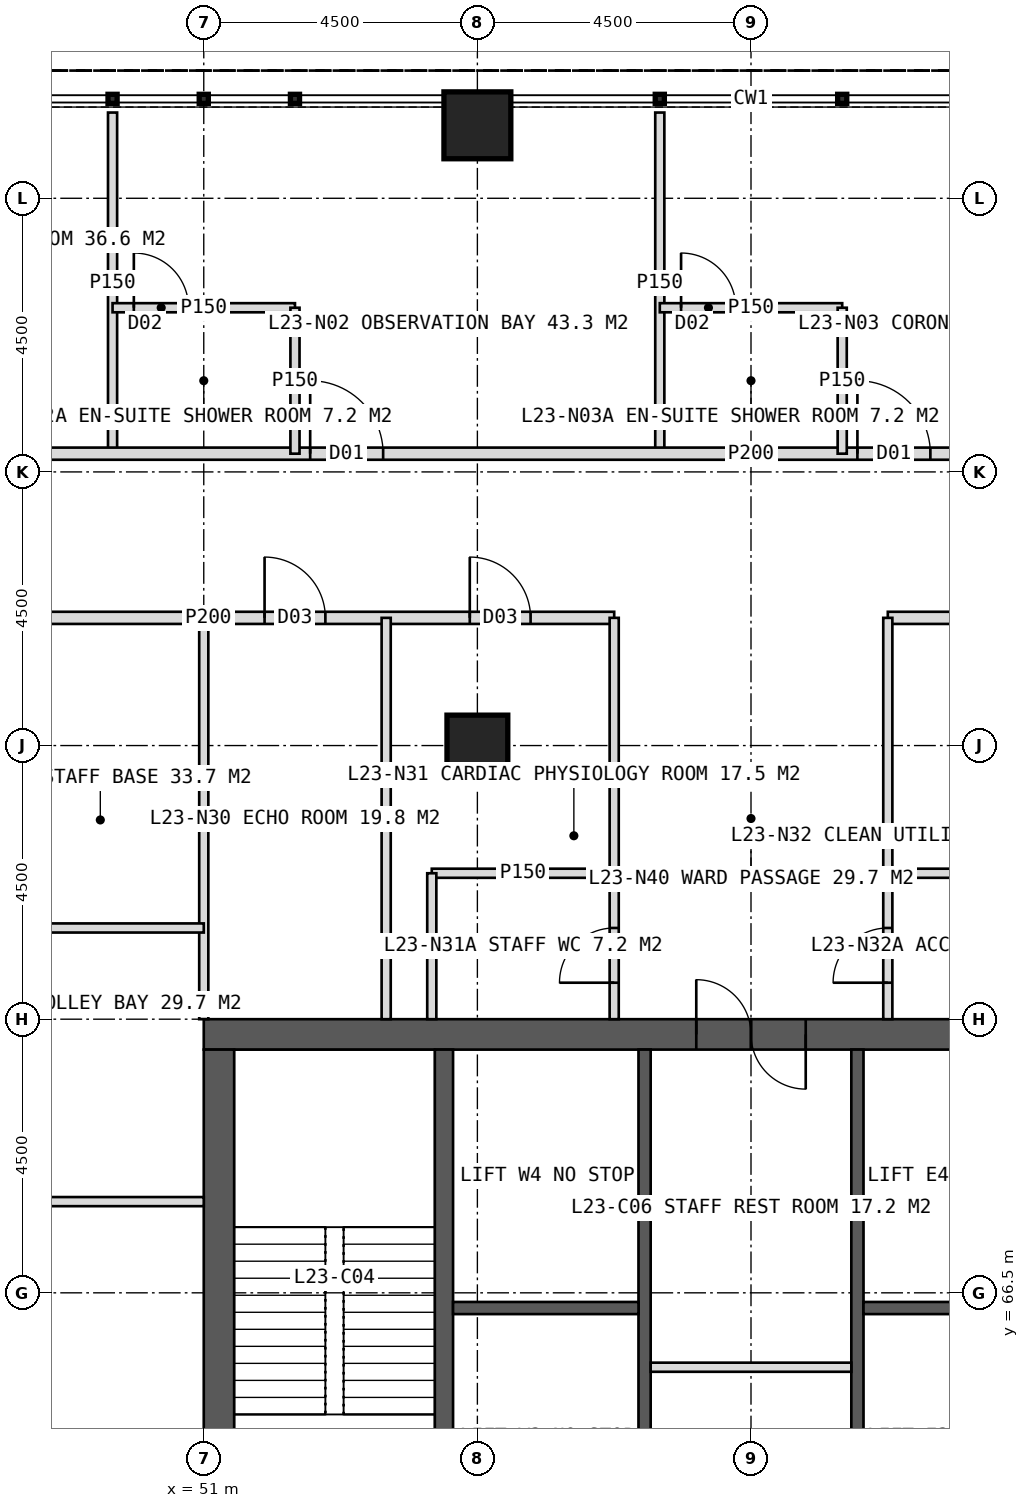
"""IFC4 building model, lengths in metres.
Left out: names, types, materials, properties, quantities, classifications, styles, units other than length and angle.
Written with IfcOpenShell. Run it as: python <this file> out.ifc"""

import sys

from ifc_helpers import new_model, si_unit, direction, frame, frame_2d, origin, origin_2d, place, context, subcontext, project, spatial, rectangle, hollow_rectangle, extrude, element, fill, save


model = new_model("IFC4")
c1 = context("Model", 3, precision=1e-05, world=origin(), true_north=direction((0.0, 1.0)))
c2 = subcontext(c1, "Body", "Model", "MODEL_VIEW")
j1 = project(units=[si_unit("LENGTHUNIT", "METRE"), si_unit("PLANEANGLEUNIT", "RADIAN")], contexts=[c1])
p1 = place(None, origin())
s1 = spatial("IfcSite", under=j1, at=p1, CompositionType="ELEMENT")
p2 = place(p1, origin())
s2 = spatial("IfcBuilding", under=s1, at=p2, CompositionType="ELEMENT")
p3 = place(p2, frame((0.0, 0.0, 100.0)))
s3 = spatial("IfcBuildingStorey", under=s2, at=p3, CompositionType="ELEMENT", Elevation=100.0)
p4 = place(p3, frame((51.0, 70.75, 0.0), z_axis=(0.0, 0.0, 1.0), x_axis=(1.0, 0.0, 0.0)))
e1 = element("IfcWall", 1, at=p4, inside=s3, PredefinedType="SHEAR", context=c2, shape_type="SweptSolid", body=[
    extrude(rectangle(XDim=18.0, YDim=0.5, at=frame_2d((9.0, 0.0))), origin(), (0.0, 0.0, 1.0), 4.0),
])
p5 = place(p4, frame((8.1, 0.0, 0.0)))
e2 = element("IfcOpeningElement", 2, at=p5, cuts=e1, PredefinedType="OPENING", context=c2, shape_type="SweptSolid", body=[
    extrude(rectangle(XDim=1.8, YDim=2.2, at=frame_2d((0.9, 1.1))), frame((0.0, 0.26, 0.0), z_axis=(0.0, -1.0, 0.0), x_axis=(1.0, 0.0, 0.0)), (0.0, 0.0, 1.0), 0.52),
])
p6 = place(p3, frame((51.25, 53.5, 0.0), z_axis=(0.0, 0.0, 1.0), x_axis=(0.0, 1.0, 0.0)))
e3 = element("IfcWall", 3, at=p6, inside=s3, PredefinedType="SHEAR", context=c2, shape_type="SweptSolid", body=[
    extrude(rectangle(XDim=17.0, YDim=0.5, at=frame_2d((8.5, 0.0))), origin(), (0.0, 0.0, 1.0), 4.0),
])
p7 = place(p6, frame((6.0, 0.0, 0.0)))
e4 = element("IfcOpeningElement", 4, at=p7, cuts=e3, PredefinedType="OPENING", context=c2, shape_type="SweptSolid", body=[
    extrude(rectangle(XDim=1.5, YDim=2.2, at=frame_2d((0.75, 1.1))), frame((0.0, 0.26, 0.0), z_axis=(0.0, -1.0, 0.0), x_axis=(1.0, 0.0, 0.0)), (0.0, 0.0, 1.0), 0.52),
])
p8 = place(p3, frame((54.95, 53.5, 0.0), z_axis=(0.0, 0.0, 1.0), x_axis=(0.0, 1.0, 0.0)))
e5 = element("IfcWall", 5, at=p8, inside=s3, PredefinedType="SHEAR", context=c2, shape_type="SweptSolid", body=[
    extrude(rectangle(XDim=17.0, YDim=0.3, at=frame_2d((8.5, 0.0))), origin(), (0.0, 0.0, 1.0), 4.0),
])
p9 = place(p3, frame((58.25, 53.5, 0.0), z_axis=(0.0, 0.0, 1.0), x_axis=(0.0, 1.0, 0.0)))
e6 = element("IfcWall", 6, at=p9, inside=s3, PredefinedType="SHEAR", context=c2, shape_type="SweptSolid", body=[
    extrude(rectangle(XDim=17.0, YDim=0.2, at=frame_2d((8.5, 0.0))), origin(), (0.0, 0.0, 1.0), 4.0),
])
p10 = place(p9, frame((1.375, 0.0, 0.0)))
e7 = element("IfcOpeningElement", 7, at=p10, cuts=e6, PredefinedType="OPENING", context=c2, shape_type="SweptSolid", body=[
    extrude(rectangle(XDim=1.4, YDim=2.2, at=frame_2d((0.7, 1.1))), frame((0.0, 0.11, 0.0), z_axis=(0.0, -1.0, 0.0), x_axis=(1.0, 0.0, 0.0)), (0.0, 0.0, 1.0), 0.22),
])
p11 = place(p9, frame((5.675, 0.0, 0.0)))
e8 = element("IfcOpeningElement", 8, at=p11, cuts=e6, PredefinedType="OPENING", context=c2, shape_type="SweptSolid", body=[
    extrude(rectangle(XDim=1.4, YDim=2.2, at=frame_2d((0.7, 1.1))), frame((0.0, 0.11, 0.0), z_axis=(0.0, -1.0, 0.0), x_axis=(1.0, 0.0, 0.0)), (0.0, 0.0, 1.0), 0.22),
])
p12 = place(p3, frame((61.75, 53.5, 0.0), z_axis=(0.0, 0.0, 1.0), x_axis=(0.0, 1.0, 0.0)))
e9 = element("IfcWall", 9, at=p12, inside=s3, PredefinedType="SHEAR", context=c2, shape_type="SweptSolid", body=[
    extrude(rectangle(XDim=17.0, YDim=0.2, at=frame_2d((8.5, 0.0))), origin(), (0.0, 0.0, 1.0), 4.0),
])
p13 = place(p12, frame((1.375, 0.0, 0.0)))
e10 = element("IfcOpeningElement", 10, at=p13, cuts=e9, PredefinedType="OPENING", context=c2, shape_type="SweptSolid", body=[
    extrude(rectangle(XDim=1.4, YDim=2.2, at=frame_2d((0.7, 1.1))), frame((0.0, 0.11, 0.0), z_axis=(0.0, -1.0, 0.0), x_axis=(1.0, 0.0, 0.0)), (0.0, 0.0, 1.0), 0.22),
])
p14 = place(p12, frame((5.675, 0.0, 0.0)))
e11 = element("IfcOpeningElement", 11, at=p14, cuts=e9, PredefinedType="OPENING", context=c2, shape_type="SweptSolid", body=[
    extrude(rectangle(XDim=1.4, YDim=2.2, at=frame_2d((0.7, 1.1))), frame((0.0, 0.11, 0.0), z_axis=(0.0, -1.0, 0.0), x_axis=(1.0, 0.0, 0.0)), (0.0, 0.0, 1.0), 0.22),
])
for number, where, z_axis, x_axis in (
    (12, (55.1, 66.25, 0.0), (0.0, 0.0, 1.0), (1.0, 0.0, 0.0)),
    (13, (61.85, 66.25, 0.0), (0.0, 0.0, 1.0), (1.0, 0.0, 0.0)),
):
    element("IfcWall", number, at=place(p3, frame(where, z_axis=z_axis, x_axis=x_axis)), inside=s3, PredefinedType="SHEAR", context=c2, shape_type="SweptSolid", body=[
        extrude(rectangle(XDim=3.05, YDim=0.2, at=frame_2d((1.525, 0.0))), origin(), (0.0, 0.0, 1.0), 4.0),
    ])
p15 = place(p3, frame((55.5, 75.5, 0.0), z_axis=(0.0, 0.0, 1.0), x_axis=(1.0, 0.0, 0.0)))
e14 = element("IfcColumn", 14, at=p15, inside=s3, PredefinedType="COLUMN", context=c2, shape_type="SweptSolid", body=[
    extrude(hollow_rectangle(XDim=1.0, YDim=1.0, WallThickness=0.1, at=origin_2d()), origin(), (0.0, 0.0, 1.0), 4.0),
])
p16 = place(p3, frame((55.5, 85.7, 0.0), z_axis=(0.0, 0.0, 1.0), x_axis=(1.0, 0.0, 0.0)))
e15 = element("IfcColumn", 15, at=p16, inside=s3, PredefinedType="COLUMN", context=c2, shape_type="SweptSolid", body=[
    extrude(hollow_rectangle(XDim=1.1, YDim=1.1, WallThickness=0.1, at=origin_2d()), origin(), (0.0, 0.0, 1.0), 4.0),
])
for number, where, z_axis, x_axis in (
    (16, (49.5, 80.3, 0.0), (0.0, 0.0, 1.0), (0.0, 1.0, 0.0)),
    (17, (58.5, 80.3, 0.0), (0.0, 0.0, 1.0), (0.0, 1.0, 0.0)),
):
    element("IfcWall", number, at=place(p3, frame(where, z_axis=z_axis, x_axis=x_axis)), inside=s3, PredefinedType="PARTITIONING", context=c2, shape_type="SweptSolid", body=[
        extrude(rectangle(XDim=5.61, YDim=0.15, at=frame_2d((2.805, 0.0))), origin(), (0.0, 0.0, 1.0), 3.75),
    ])
p17 = place(p3, frame((41.7, 80.3, 0.0), z_axis=(0.0, 0.0, 1.0), x_axis=(1.0, 0.0, 0.0)))
e18 = element("IfcWall", 18, at=p17, inside=s3, PredefinedType="PARTITIONING", context=c2, shape_type="SweptSolid", body=[
    extrude(rectangle(XDim=36.6, YDim=0.2, at=frame_2d((18.3, 0.0))), origin(), (0.0, 0.0, 1.0), 3.75),
])
p18 = place(p17, frame((3.25, 0.0, 0.0)))
e19 = element("IfcOpeningElement", 19, at=p18, cuts=e18, PredefinedType="OPENING", context=c2, shape_type="SweptSolid", body=[
    extrude(rectangle(XDim=1.2, YDim=2.2, at=frame_2d((0.6, 1.1))), frame((0.0, 0.11, 0.0), z_axis=(0.0, -1.0, 0.0), x_axis=(1.0, 0.0, 0.0)), (0.0, 0.0, 1.0), 0.22),
])
p19 = place(p17, frame((11.05, 0.0, 0.0)))
e20 = element("IfcOpeningElement", 20, at=p19, cuts=e18, PredefinedType="OPENING", context=c2, shape_type="SweptSolid", body=[
    extrude(rectangle(XDim=1.2, YDim=2.2, at=frame_2d((0.6, 1.1))), frame((0.0, 0.11, 0.0), z_axis=(0.0, -1.0, 0.0), x_axis=(1.0, 0.0, 0.0)), (0.0, 0.0, 1.0), 0.22),
])
p20 = place(p17, frame((20.05, 0.0, 0.0)))
e21 = element("IfcOpeningElement", 21, at=p20, cuts=e18, PredefinedType="OPENING", context=c2, shape_type="SweptSolid", body=[
    extrude(rectangle(XDim=1.2, YDim=2.2, at=frame_2d((0.6, 1.1))), frame((0.0, 0.11, 0.0), z_axis=(0.0, -1.0, 0.0), x_axis=(1.0, 0.0, 0.0)), (0.0, 0.0, 1.0), 0.22),
])
p21 = place(p17, frame((29.05, 0.0, 0.0)))
e22 = element("IfcOpeningElement", 22, at=p21, cuts=e18, PredefinedType="OPENING", context=c2, shape_type="SweptSolid", body=[
    extrude(rectangle(XDim=1.2, YDim=2.2, at=frame_2d((0.6, 1.1))), frame((0.0, 0.11, 0.0), z_axis=(0.0, -1.0, 0.0), x_axis=(1.0, 0.0, 0.0)), (0.0, 0.0, 1.0), 0.22),
])
p22 = place(p17, frame((34.95, 0.0, 0.0)))
e23 = element("IfcOpeningElement", 23, at=p22, cuts=e18, PredefinedType="OPENING", context=c2, shape_type="SweptSolid", body=[
    extrude(rectangle(XDim=1.0, YDim=2.1, at=frame_2d((0.5, 1.05))), frame((0.0, 0.11, 0.0), z_axis=(0.0, -1.0, 0.0), x_axis=(1.0, 0.0, 0.0)), (0.0, 0.0, 1.0), 0.22),
])
p23 = place(p3, frame((49.5, 82.7, 0.0), z_axis=(0.0, 0.0, 1.0), x_axis=(1.0, 0.0, 0.0)))
e24 = element("IfcWall", 24, at=p23, inside=s3, PredefinedType="PARTITIONING", context=c2, shape_type="SweptSolid", body=[
    extrude(rectangle(XDim=3.0, YDim=0.15, at=frame_2d((1.5, 0.0))), origin(), (0.0, 0.0, 1.0), 3.75),
])
p24 = place(p23, frame((0.35, 0.0, 0.0)))
e25 = element("IfcOpeningElement", 25, at=p24, cuts=e24, PredefinedType="OPENING", context=c2, shape_type="SweptSolid", body=[
    extrude(rectangle(XDim=0.9, YDim=2.1, at=frame_2d((0.45, 1.05))), frame((0.0, 0.085, 0.0), z_axis=(0.0, -1.0, 0.0), x_axis=(1.0, 0.0, 0.0)), (0.0, 0.0, 1.0), 0.17),
])
p25 = place(p3, frame((52.5, 80.3, 0.0), z_axis=(0.0, 0.0, 1.0), x_axis=(0.0, 1.0, 0.0)))
e26 = element("IfcWall", 26, at=p25, inside=s3, PredefinedType="PARTITIONING", context=c2, shape_type="SweptSolid", body=[
    extrude(rectangle(XDim=2.4, YDim=0.15, at=frame_2d((1.2, 0.0))), origin(), (0.0, 0.0, 1.0), 3.75),
])
p26 = place(p3, frame((58.5, 82.7, 0.0), z_axis=(0.0, 0.0, 1.0), x_axis=(1.0, 0.0, 0.0)))
e27 = element("IfcWall", 27, at=p26, inside=s3, PredefinedType="PARTITIONING", context=c2, shape_type="SweptSolid", body=[
    extrude(rectangle(XDim=3.0, YDim=0.15, at=frame_2d((1.5, 0.0))), origin(), (0.0, 0.0, 1.0), 3.75),
])
p27 = place(p26, frame((0.35, 0.0, 0.0)))
e28 = element("IfcOpeningElement", 28, at=p27, cuts=e27, PredefinedType="OPENING", context=c2, shape_type="SweptSolid", body=[
    extrude(rectangle(XDim=0.9, YDim=2.1, at=frame_2d((0.45, 1.05))), frame((0.0, 0.085, 0.0), z_axis=(0.0, -1.0, 0.0), x_axis=(1.0, 0.0, 0.0)), (0.0, 0.0, 1.0), 0.17),
])
p28 = place(p3, frame((61.5, 80.3, 0.0), z_axis=(0.0, 0.0, 1.0), x_axis=(0.0, 1.0, 0.0)))
e29 = element("IfcWall", 29, at=p28, inside=s3, PredefinedType="PARTITIONING", context=c2, shape_type="SweptSolid", body=[
    extrude(rectangle(XDim=2.4, YDim=0.15, at=frame_2d((1.2, 0.0))), origin(), (0.0, 0.0, 1.0), 3.75),
])
p29 = place(p3, frame((51.0, 71.0, 0.0), z_axis=(0.0, 0.0, 1.0), x_axis=(0.0, 1.0, 0.0)))
e30 = element("IfcWall", 30, at=p29, inside=s3, PredefinedType="PARTITIONING", context=c2, shape_type="SweptSolid", body=[
    extrude(rectangle(XDim=6.6, YDim=0.15, at=frame_2d((3.3, 0.0))), origin(), (0.0, 0.0, 1.0), 3.75),
])
p30 = place(p3, frame((44.4, 77.6, 0.0), z_axis=(0.0, 0.0, 1.0), x_axis=(1.0, 0.0, 0.0)))
e31 = element("IfcWall", 31, at=p30, inside=s3, PredefinedType="PARTITIONING", context=c2, shape_type="SweptSolid", body=[
    extrude(rectangle(XDim=13.35, YDim=0.2, at=frame_2d((6.675, 0.0))), origin(), (0.0, 0.0, 1.0), 3.75),
])
p31 = place(p30, frame((7.6, 0.0, 0.0)))
e32 = element("IfcOpeningElement", 32, at=p31, cuts=e31, PredefinedType="OPENING", context=c2, shape_type="SweptSolid", body=[
    extrude(rectangle(XDim=1.0, YDim=2.1, at=frame_2d((0.5, 1.05))), frame((0.0, 0.11, 0.0), z_axis=(0.0, -1.0, 0.0), x_axis=(1.0, 0.0, 0.0)), (0.0, 0.0, 1.0), 0.22),
])
p32 = place(p30, frame((10.975, 0.0, 0.0)))
e33 = element("IfcOpeningElement", 33, at=p32, cuts=e31, PredefinedType="OPENING", context=c2, shape_type="SweptSolid", body=[
    extrude(rectangle(XDim=1.0, YDim=2.1, at=frame_2d((0.5, 1.05))), frame((0.0, 0.11, 0.0), z_axis=(0.0, -1.0, 0.0), x_axis=(1.0, 0.0, 0.0)), (0.0, 0.0, 1.0), 0.22),
])
p33 = place(p3, frame((62.25, 77.6, 0.0), z_axis=(0.0, 0.0, 1.0), x_axis=(1.0, 0.0, 0.0)))
e34 = element("IfcWall", 34, at=p33, inside=s3, PredefinedType="PARTITIONING", context=c2, shape_type="SweptSolid", body=[
    extrude(rectangle(XDim=6.75, YDim=0.2, at=frame_2d((3.375, 0.0))), origin(), (0.0, 0.0, 1.0), 3.75),
])
p34 = place(p33, frame((1.375, 0.0, 0.0)))
e35 = element("IfcOpeningElement", 35, at=p34, cuts=e34, PredefinedType="OPENING", context=c2, shape_type="SweptSolid", body=[
    extrude(rectangle(XDim=1.0, YDim=2.1, at=frame_2d((0.5, 1.05))), frame((0.0, 0.11, 0.0), z_axis=(0.0, -1.0, 0.0), x_axis=(1.0, 0.0, 0.0)), (0.0, 0.0, 1.0), 0.22),
])
p35 = place(p33, frame((4.75, 0.0, 0.0)))
e36 = element("IfcOpeningElement", 36, at=p35, cuts=e34, PredefinedType="OPENING", context=c2, shape_type="SweptSolid", body=[
    extrude(rectangle(XDim=1.0, YDim=2.1, at=frame_2d((0.5, 1.05))), frame((0.0, 0.11, 0.0), z_axis=(0.0, -1.0, 0.0), x_axis=(1.0, 0.0, 0.0)), (0.0, 0.0, 1.0), 0.22),
])
p36 = place(p3, frame((57.75, 71.0, 0.0), z_axis=(0.0, 0.0, 1.0), x_axis=(0.0, 1.0, 0.0)))
e37 = element("IfcWall", 37, at=p36, inside=s3, PredefinedType="PARTITIONING", context=c2, shape_type="SweptSolid", body=[
    extrude(rectangle(XDim=6.6, YDim=0.15, at=frame_2d((3.3, 0.0))), origin(), (0.0, 0.0, 1.0), 3.75),
])
p37 = place(p36, frame((0.6, 0.0, 0.0)))
e38 = element("IfcOpeningElement", 38, at=p37, cuts=e37, PredefinedType="OPENING", context=c2, shape_type="SweptSolid", body=[
    extrude(rectangle(XDim=0.9, YDim=2.1, at=frame_2d((0.45, 1.05))), frame((0.0, 0.085, 0.0), z_axis=(0.0, -1.0, 0.0), x_axis=(1.0, 0.0, 0.0)), (0.0, 0.0, 1.0), 0.17),
])
p38 = place(p3, frame((62.25, 71.0, 0.0), z_axis=(0.0, 0.0, 1.0), x_axis=(0.0, 1.0, 0.0)))
e39 = element("IfcWall", 39, at=p38, inside=s3, PredefinedType="PARTITIONING", context=c2, shape_type="SweptSolid", body=[
    extrude(rectangle(XDim=6.6, YDim=0.15, at=frame_2d((3.3, 0.0))), origin(), (0.0, 0.0, 1.0), 3.75),
])
p39 = place(p38, frame((0.6, 0.0, 0.0)))
e40 = element("IfcOpeningElement", 40, at=p39, cuts=e39, PredefinedType="OPENING", context=c2, shape_type="SweptSolid", body=[
    extrude(rectangle(XDim=0.9, YDim=2.1, at=frame_2d((0.45, 1.05))), frame((0.0, 0.085, 0.0), z_axis=(0.0, -1.0, 0.0), x_axis=(1.0, 0.0, 0.0)), (0.0, 0.0, 1.0), 0.17),
])
p40 = place(p3, frame((54.0, 71.0, 0.0), z_axis=(0.0, 0.0, 1.0), x_axis=(0.0, 1.0, 0.0)))
e41 = element("IfcWall", 41, at=p40, inside=s3, PredefinedType="PARTITIONING", context=c2, shape_type="SweptSolid", body=[
    extrude(rectangle(XDim=6.6, YDim=0.15, at=frame_2d((3.3, 0.0))), origin(), (0.0, 0.0, 1.0), 3.75),
])
p41 = place(p3, frame((54.75, 73.4, 0.0), z_axis=(0.0, 0.0, 1.0), x_axis=(1.0, 0.0, 0.0)))
e42 = element("IfcWall", 42, at=p41, inside=s3, PredefinedType="PARTITIONING", context=c2, shape_type="SweptSolid", body=[
    extrude(rectangle(XDim=3.0, YDim=0.15, at=frame_2d((1.5, 0.0))), origin(), (0.0, 0.0, 1.0), 3.75),
])
p42 = place(p3, frame((54.75, 71.0, 0.0), z_axis=(0.0, 0.0, 1.0), x_axis=(0.0, 1.0, 0.0)))
e43 = element("IfcWall", 43, at=p42, inside=s3, PredefinedType="PARTITIONING", context=c2, shape_type="SweptSolid", body=[
    extrude(rectangle(XDim=2.4, YDim=0.15, at=frame_2d((1.2, 0.0))), origin(), (0.0, 0.0, 1.0), 3.75),
])
p43 = place(p3, frame((62.25, 73.4, 0.0), z_axis=(0.0, 0.0, 1.0), x_axis=(1.0, 0.0, 0.0)))
e44 = element("IfcWall", 44, at=p43, inside=s3, PredefinedType="PARTITIONING", context=c2, shape_type="SweptSolid", body=[
    extrude(rectangle(XDim=3.0, YDim=0.15, at=frame_2d((1.5, 0.0))), origin(), (0.0, 0.0, 1.0), 3.75),
])
for number, where, z_axis, x_axis in (
    (45, (51.0, 68.0, 0.0), (0.0, 0.0, 1.0), (-1.0, 0.0, 0.0)),
    (46, (51.0, 72.5, 0.0), (0.0, 0.0, 1.0), (-1.0, 0.0, 0.0)),
):
    element("IfcWall", number, at=place(p3, frame(where, z_axis=z_axis, x_axis=x_axis)), inside=s3, PredefinedType="PARTITIONING", context=c2, shape_type="SweptSolid", body=[
        extrude(rectangle(XDim=6.6, YDim=0.15, at=frame_2d((3.3, 0.0))), origin(), (0.0, 0.0, 1.0), 3.75),
    ])
p44 = place(p3, frame((58.35, 65.277, 0.0), z_axis=(0.0, 0.0, 1.0), x_axis=(1.0, 0.0, 0.0)))
e47 = element("IfcWall", 47, at=p44, inside=s3, PredefinedType="PARTITIONING", context=c2, shape_type="SweptSolid", body=[
    extrude(rectangle(XDim=3.3, YDim=0.15, at=frame_2d((1.65, 0.0))), origin(), (0.0, 0.0, 1.0), 3.75),
])
p45 = place(p19, origin())
e48 = element("IfcDoor", 48, at=p45, inside=s3, OperationType="SINGLE_SWING_LEFT", PredefinedType="DOOR", context=c2, shape_type="SweptSolid", body=[
    extrude(rectangle(XDim=1.2, YDim=2.2, at=frame_2d((0.6, 1.1))), frame((0.0, 0.025, 0.0), z_axis=(0.0, -1.0, 0.0), x_axis=(1.0, 0.0, 0.0)), (0.0, 0.0, 1.0), 0.05),
])
fill(e20, e48)
p46 = place(p24, origin())
e49 = element("IfcDoor", 49, at=p46, inside=s3, OperationType="SINGLE_SWING_LEFT", PredefinedType="DOOR", context=c2, shape_type="SweptSolid", body=[
    extrude(rectangle(XDim=0.9, YDim=2.1, at=frame_2d((0.45, 1.05))), frame((0.0, 0.025, 0.0), z_axis=(0.0, -1.0, 0.0), x_axis=(1.0, 0.0, 0.0)), (0.0, 0.0, 1.0), 0.05),
])
fill(e25, e49)
p47 = place(p20, origin())
e50 = element("IfcDoor", 50, at=p47, inside=s3, OperationType="SINGLE_SWING_LEFT", PredefinedType="DOOR", context=c2, shape_type="SweptSolid", body=[
    extrude(rectangle(XDim=1.2, YDim=2.2, at=frame_2d((0.6, 1.1))), frame((0.0, 0.025, 0.0), z_axis=(0.0, -1.0, 0.0), x_axis=(1.0, 0.0, 0.0)), (0.0, 0.0, 1.0), 0.05),
])
fill(e21, e50)
p48 = place(p27, origin())
e51 = element("IfcDoor", 51, at=p48, inside=s3, OperationType="SINGLE_SWING_LEFT", PredefinedType="DOOR", context=c2, shape_type="SweptSolid", body=[
    extrude(rectangle(XDim=0.9, YDim=2.1, at=frame_2d((0.45, 1.05))), frame((0.0, 0.025, 0.0), z_axis=(0.0, -1.0, 0.0), x_axis=(1.0, 0.0, 0.0)), (0.0, 0.0, 1.0), 0.05),
])
fill(e28, e51)
p49 = place(p31, origin())
e52 = element("IfcDoor", 52, at=p49, inside=s3, OperationType="SINGLE_SWING_LEFT", PredefinedType="DOOR", context=c2, shape_type="SweptSolid", body=[
    extrude(rectangle(XDim=1.0, YDim=2.1, at=frame_2d((0.5, 1.05))), frame((0.0, 0.025, 0.0), z_axis=(0.0, -1.0, 0.0), x_axis=(1.0, 0.0, 0.0)), (0.0, 0.0, 1.0), 0.05),
])
fill(e32, e52)
p50 = place(p37, origin())
e53 = element("IfcDoor", 53, at=p50, inside=s3, OperationType="SINGLE_SWING_LEFT", PredefinedType="DOOR", context=c2, shape_type="SweptSolid", body=[
    extrude(rectangle(XDim=0.9, YDim=2.1, at=frame_2d((0.45, 1.05))), frame((0.0, 0.025, 0.0), z_axis=(0.0, -1.0, 0.0), x_axis=(1.0, 0.0, 0.0)), (0.0, 0.0, 1.0), 0.05),
])
fill(e38, e53)
p51 = place(p32, origin())
e54 = element("IfcDoor", 54, at=p51, inside=s3, OperationType="SINGLE_SWING_LEFT", PredefinedType="DOOR", context=c2, shape_type="SweptSolid", body=[
    extrude(rectangle(XDim=1.0, YDim=2.1, at=frame_2d((0.5, 1.05))), frame((0.0, 0.025, 0.0), z_axis=(0.0, -1.0, 0.0), x_axis=(1.0, 0.0, 0.0)), (0.0, 0.0, 1.0), 0.05),
])
fill(e33, e54)
p52 = place(p39, origin())
e55 = element("IfcDoor", 55, at=p52, inside=s3, OperationType="SINGLE_SWING_LEFT", PredefinedType="DOOR", context=c2, shape_type="SweptSolid", body=[
    extrude(rectangle(XDim=0.9, YDim=2.1, at=frame_2d((0.45, 1.05))), frame((0.0, 0.025, 0.0), z_axis=(0.0, -1.0, 0.0), x_axis=(1.0, 0.0, 0.0)), (0.0, 0.0, 1.0), 0.05),
])
fill(e40, e55)
p53 = place(p5, origin())
e56 = element("IfcDoor", 56, at=p53, inside=s3, OperationType="DOUBLE_DOOR_SINGLE_SWING", PredefinedType="DOOR", context=c2, shape_type="SweptSolid", body=[
    extrude(rectangle(XDim=1.8, YDim=2.2, at=frame_2d((0.9, 1.1))), frame((0.0, 0.025, 0.0), z_axis=(0.0, -1.0, 0.0), x_axis=(1.0, 0.0, 0.0)), (0.0, 0.0, 1.0), 0.05),
])
fill(e2, e56)
save(model, sys.argv[1])
